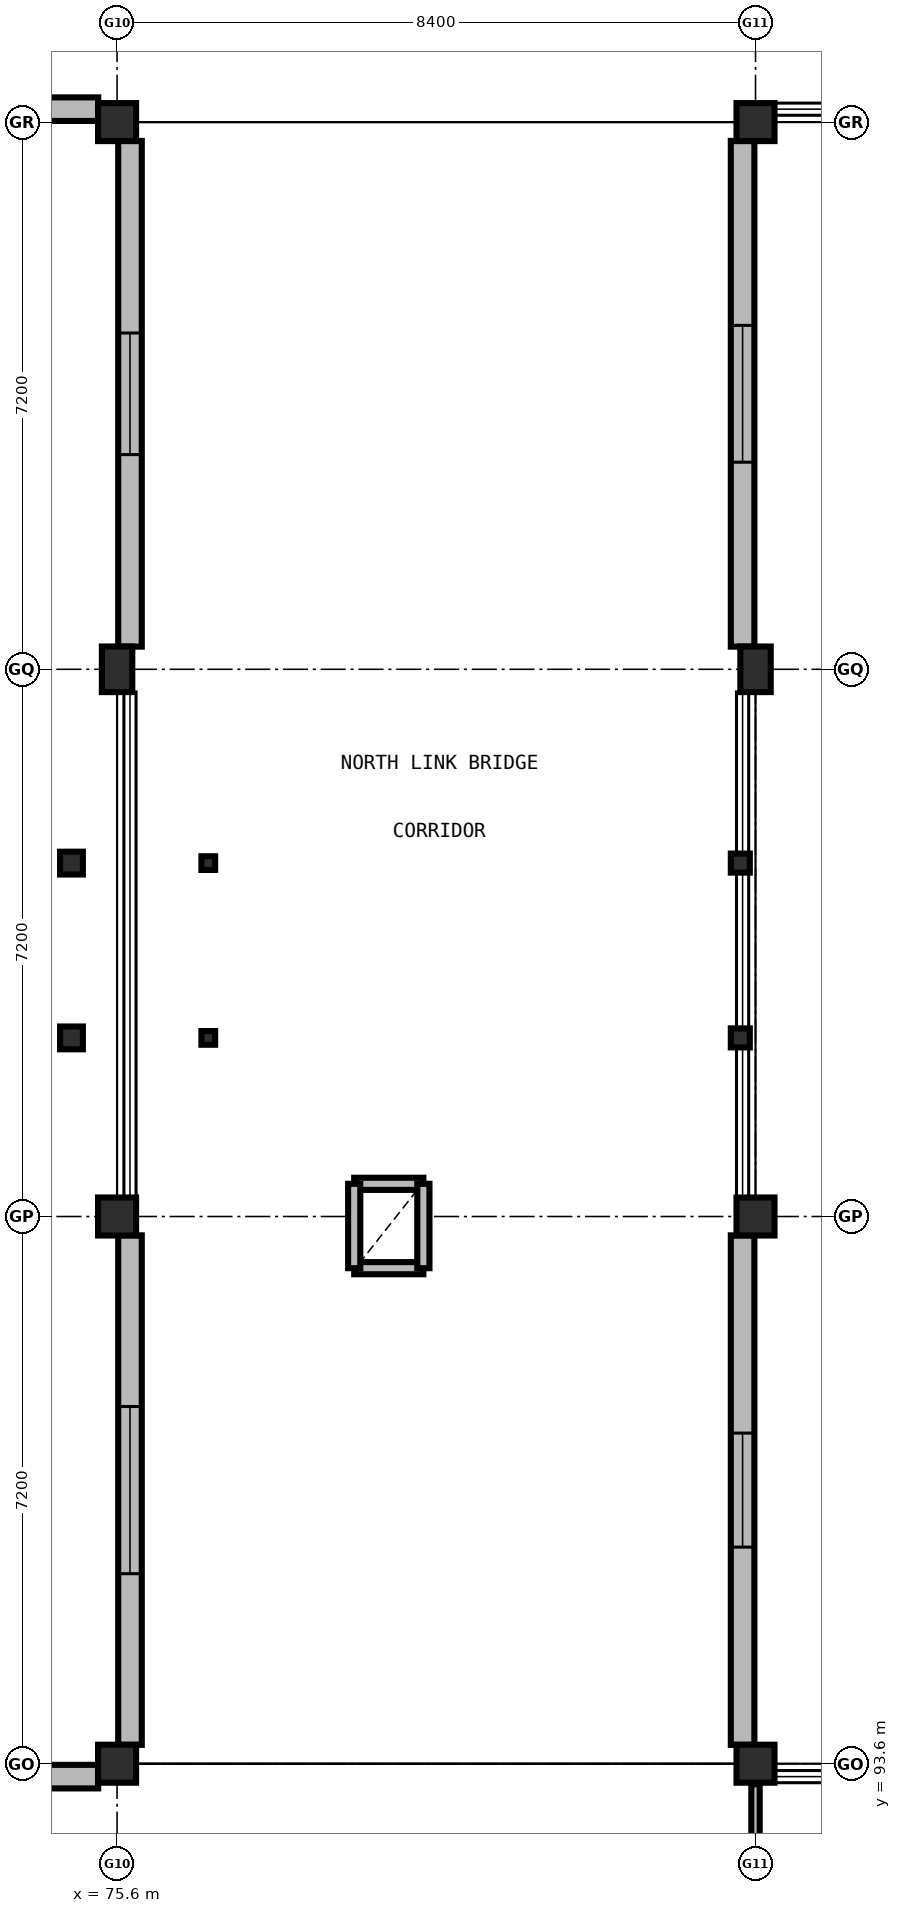
"""IFC4 building model, lengths in metres.
Left out: names, types, materials, properties, quantities, classifications, styles, units other than length and angle.
Written with IfcOpenShell. Run it as: python <this file> out.ifc"""

import sys

from ifc_helpers import new_model, si_unit, direction, frame, frame_2d, origin, origin_2d, place, context, subcontext, project, spatial, rectangle, hollow_rectangle, i_section, extrude, element, fill, save


model = new_model("IFC4")
c1 = context("Model", 3, precision=1e-05, world=origin(), true_north=direction((0.0, 1.0)))
c2 = subcontext(c1, "Body", "Model", "MODEL_VIEW")
j1 = project(units=[si_unit("LENGTHUNIT", "METRE"), si_unit("PLANEANGLEUNIT", "RADIAN")], contexts=[c1])
p1 = place(None, origin())
s1 = spatial("IfcSite", under=j1, at=p1, CompositionType="ELEMENT")
p2 = place(p1, origin())
s2 = spatial("IfcBuilding", under=s1, at=p2, CompositionType="ELEMENT")
p3 = place(p2, frame((0.0, 0.0, 13.5)))
s3 = spatial("IfcBuildingStorey", under=s2, at=p3, CompositionType="ELEMENT", Elevation=13.5)
for number, where, z_axis, x_axis in (
    (1, (75.6, 93.6, 0.0), (0.0, 0.0, 1.0), (1.0, 0.0, 0.0)),
    (2, (75.6, 100.8, 0.0), (0.0, 0.0, 1.0), (1.0, 0.0, 0.0)),
):
    element("IfcColumn", number, at=place(p3, frame(where, z_axis=z_axis, x_axis=x_axis)), inside=s3, PredefinedType="COLUMN", context=c2, shape_type="SweptSolid", body=[
        extrude(rectangle(XDim=0.5, YDim=0.5, at=origin_2d()), origin(), (0.0, 0.0, 1.0), 4.2),
    ])
p4 = place(p3, frame((75.6, 108.0, 0.0), z_axis=(0.0, 0.0, 1.0), x_axis=(1.0, 0.0, 0.0)))
e3 = element("IfcColumn", 3, at=p4, inside=s3, PredefinedType="COLUMN", context=c2, shape_type="SweptSolid", body=[
    extrude(rectangle(XDim=0.4, YDim=0.6, at=origin_2d()), origin(), (0.0, 0.0, 1.0), 4.2),
])
for number, where, z_axis, x_axis in (
    (4, (75.6, 115.2, 0.0), (0.0, 0.0, 1.0), (1.0, 0.0, 0.0)),
    (5, (84.0, 93.6, 0.0), (0.0, 0.0, 1.0), (1.0, 0.0, 0.0)),
    (6, (84.0, 100.8, 0.0), (0.0, 0.0, 1.0), (1.0, 0.0, 0.0)),
):
    element("IfcColumn", number, at=place(p3, frame(where, z_axis=z_axis, x_axis=x_axis)), inside=s3, PredefinedType="COLUMN", context=c2, shape_type="SweptSolid", body=[
        extrude(rectangle(XDim=0.5, YDim=0.5, at=origin_2d()), origin(), (0.0, 0.0, 1.0), 4.2),
    ])
p5 = place(p3, frame((84.0, 108.0, 0.0), z_axis=(0.0, 0.0, 1.0), x_axis=(1.0, 0.0, 0.0)))
e7 = element("IfcColumn", 7, at=p5, inside=s3, PredefinedType="COLUMN", context=c2, shape_type="SweptSolid", body=[
    extrude(rectangle(XDim=0.4, YDim=0.6, at=origin_2d()), origin(), (0.0, 0.0, 1.0), 4.2),
])
p6 = place(p3, frame((84.0, 115.2, 0.0), z_axis=(0.0, 0.0, 1.0), x_axis=(1.0, 0.0, 0.0)))
e8 = element("IfcColumn", 8, at=p6, inside=s3, PredefinedType="COLUMN", context=c2, shape_type="SweptSolid", body=[
    extrude(rectangle(XDim=0.5, YDim=0.5, at=origin_2d()), origin(), (0.0, 0.0, 1.0), 4.2),
])
for number, where, z_axis, x_axis in (
    (9, (75.0, 103.15, 0.0), (0.0, 0.0, 1.0), (1.0, 0.0, 0.0)),
    (10, (75.0, 105.45, 0.0), (0.0, 0.0, 1.0), (1.0, 0.0, 0.0)),
):
    element("IfcColumn", number, at=place(p3, frame(where, z_axis=z_axis, x_axis=x_axis)), inside=s3, PredefinedType="COLUMN", context=c2, shape_type="SweptSolid", body=[
        extrude(i_section(OverallWidth=0.3, OverallDepth=0.3, WebThickness=0.011, FlangeThickness=0.019, FilletRadius=0.027, at=origin_2d()), origin(), (0.0, 0.0, 1.0), 4.2),
    ])
for number, where, z_axis, x_axis in (
    (11, (76.8, 103.15, 0.0), (0.0, 0.0, 1.0), (1.0, 0.0, 0.0)),
    (12, (76.8, 105.45, 0.0), (0.0, 0.0, 1.0), (1.0, 0.0, 0.0)),
):
    element("IfcColumn", number, at=place(p3, frame(where, z_axis=z_axis, x_axis=x_axis)), inside=s3, PredefinedType="COLUMN", context=c2, shape_type="SweptSolid", body=[
        extrude(hollow_rectangle(XDim=0.18, YDim=0.18, WallThickness=0.008, at=origin_2d()), origin(), (0.0, 0.0, 1.0), 4.2),
    ])
for number, where, z_axis, x_axis in (
    (13, (83.8, 103.15, 0.0), (0.0, 0.0, 1.0), (1.0, 0.0, 0.0)),
    (14, (83.8, 105.45, 0.0), (0.0, 0.0, 1.0), (1.0, 0.0, 0.0)),
):
    element("IfcColumn", number, at=place(p3, frame(where, z_axis=z_axis, x_axis=x_axis)), inside=s3, PredefinedType="COLUMN", context=c2, shape_type="SweptSolid", body=[
        extrude(hollow_rectangle(XDim=0.25, YDim=0.25, WallThickness=0.01, at=origin_2d()), origin(), (0.0, 0.0, 1.0), 4.2),
    ])
p7 = place(p3, frame((67.448, 93.43, 0.0), z_axis=(0.0, 0.0, 1.0), x_axis=(1.0, 0.0, 0.0)))
e15 = element("IfcWall", 15, at=p7, inside=s3, PredefinedType="SOLIDWALL", context=c2, shape_type="SweptSolid", body=[
    extrude(rectangle(XDim=7.904, YDim=0.31, at=frame_2d((3.952, 0.0))), origin(), (0.0, 0.0, 1.0), 3.16),
])
p8 = place(p7, frame((2.252, 0.0, 0.95)))
e16 = element("IfcOpeningElement", 16, at=p8, cuts=e15, PredefinedType="OPENING", context=c2, shape_type="SweptSolid", body=[
    extrude(rectangle(XDim=3.4, YDim=1.8, at=frame_2d((1.7, 0.9))), frame((0.0, 0.165, 0.0), z_axis=(0.0, -1.0, 0.0), x_axis=(1.0, 0.0, 0.0)), (0.0, 0.0, 1.0), 0.33),
])
p9 = place(p3, frame((75.77, 93.848, 0.0), z_axis=(0.0, 0.0, 1.0), x_axis=(0.0, 1.0, 0.0)))
e17 = element("IfcWall", 17, at=p9, inside=s3, PredefinedType="SOLIDWALL", context=c2, shape_type="SweptSolid", body=[
    extrude(rectangle(XDim=6.704, YDim=0.31, at=frame_2d((3.352, 0.0))), origin(), (0.0, 0.0, 1.0), 3.86),
])
p10 = place(p9, frame((2.252, 0.0, 0.95)))
e18 = element("IfcOpeningElement", 18, at=p10, cuts=e17, PredefinedType="OPENING", context=c2, shape_type="SweptSolid", body=[
    extrude(rectangle(XDim=2.2, YDim=1.7, at=frame_2d((1.1, 0.85))), frame((0.0, 0.165, 0.0), z_axis=(0.0, -1.0, 0.0), x_axis=(1.0, 0.0, 0.0)), (0.0, 0.0, 1.0), 0.33),
])
p11 = place(p3, frame((75.77, 108.298, 0.0), z_axis=(0.0, 0.0, 1.0), x_axis=(0.0, 1.0, 0.0)))
e19 = element("IfcWall", 19, at=p11, inside=s3, PredefinedType="SOLIDWALL", context=c2, shape_type="SweptSolid", body=[
    extrude(rectangle(XDim=6.654, YDim=0.31, at=frame_2d((3.327, 0.0))), origin(), (0.0, 0.0, 1.0), 3.86),
])
p12 = place(p11, frame((2.527, 0.0, 0.95)))
e20 = element("IfcOpeningElement", 20, at=p12, cuts=e19, PredefinedType="OPENING", context=c2, shape_type="SweptSolid", body=[
    extrude(rectangle(XDim=1.6, YDim=1.6, at=frame_2d((0.8, 0.8))), frame((0.0, 0.165, 0.0), z_axis=(0.0, -1.0, 0.0), x_axis=(1.0, 0.0, 0.0)), (0.0, 0.0, 1.0), 0.33),
])
p13 = place(p3, frame((75.352, 115.37, 0.0), z_axis=(0.0, 0.0, 1.0), x_axis=(-1.0, 0.0, 0.0)))
e21 = element("IfcWall", 21, at=p13, inside=s3, PredefinedType="SOLIDWALL", context=c2, shape_type="SweptSolid", body=[
    extrude(rectangle(XDim=7.904, YDim=0.31, at=frame_2d((3.952, 0.0))), origin(), (0.0, 0.0, 1.0), 3.16),
])
p14 = place(p13, frame((0.968, 0.0, 0.95)))
e22 = element("IfcOpeningElement", 22, at=p14, cuts=e21, PredefinedType="OPENING", context=c2, shape_type="SweptSolid", body=[
    extrude(rectangle(XDim=2.5, YDim=1.96, at=frame_2d((1.25, 0.98))), frame((0.0, 0.165, 0.0), z_axis=(0.0, -1.0, 0.0), x_axis=(1.0, 0.0, 0.0)), (0.0, 0.0, 1.0), 0.33),
])
p15 = place(p13, frame((4.436, 0.0, 0.95)))
e23 = element("IfcOpeningElement", 23, at=p15, cuts=e21, PredefinedType="OPENING", context=c2, shape_type="SweptSolid", body=[
    extrude(rectangle(XDim=2.5, YDim=1.96, at=frame_2d((1.25, 0.98))), frame((0.0, 0.165, 0.0), z_axis=(0.0, -1.0, 0.0), x_axis=(1.0, 0.0, 0.0)), (0.0, 0.0, 1.0), 0.33),
])
p16 = place(p3, frame((83.83, 114.952, 0.0), z_axis=(0.0, 0.0, 1.0), x_axis=(0.0, -1.0, 0.0)))
e24 = element("IfcWall", 24, at=p16, inside=s3, PredefinedType="SOLIDWALL", context=c2, shape_type="SweptSolid", body=[
    extrude(rectangle(XDim=6.654, YDim=0.31, at=frame_2d((3.327, 0.0))), origin(), (0.0, 0.0, 1.0), 3.86),
])
p17 = place(p16, frame((2.427, 0.0, 0.95)))
e25 = element("IfcOpeningElement", 25, at=p17, cuts=e24, PredefinedType="OPENING", context=c2, shape_type="SweptSolid", body=[
    extrude(rectangle(XDim=1.8, YDim=1.5, at=frame_2d((0.9, 0.75))), frame((0.0, 0.165, 0.0), z_axis=(0.0, -1.0, 0.0), x_axis=(1.0, 0.0, 0.0)), (0.0, 0.0, 1.0), 0.33),
])
p18 = place(p3, frame((83.83, 100.552, 0.0), z_axis=(0.0, 0.0, 1.0), x_axis=(0.0, -1.0, 0.0)))
e26 = element("IfcWall", 26, at=p18, inside=s3, PredefinedType="SOLIDWALL", context=c2, shape_type="SweptSolid", body=[
    extrude(rectangle(XDim=6.704, YDim=0.31, at=frame_2d((3.352, 0.0))), origin(), (0.0, 0.0, 1.0), 3.86),
])
p19 = place(p18, frame((2.602, 0.0, 0.95)))
e27 = element("IfcOpeningElement", 27, at=p19, cuts=e26, PredefinedType="OPENING", context=c2, shape_type="SweptSolid", body=[
    extrude(rectangle(XDim=1.5, YDim=1.4, at=frame_2d((0.75, 0.7))), frame((0.0, 0.165, 0.0), z_axis=(0.0, -1.0, 0.0), x_axis=(1.0, 0.0, 0.0)), (0.0, 0.0, 1.0), 0.33),
])
for number, where, z_axis, x_axis in (
    (28, (78.72, 100.12, 0.0), (0.0, 0.0, 1.0), (1.0, 0.0, 0.0)),
    (29, (79.63, 101.23, 0.0), (0.0, 0.0, 1.0), (-1.0, 0.0, 0.0)),
):
    element("IfcWall", number, at=place(p3, frame(where, z_axis=z_axis, x_axis=x_axis)), inside=s3, PredefinedType="PARTITIONING", context=c2, shape_type="SweptSolid", body=[
        extrude(rectangle(XDim=0.91, YDim=0.16, at=frame_2d((0.455, 0.0))), origin(), (0.0, 0.0, 1.0), 3.65),
    ])
for number, where, z_axis, x_axis in (
    (30, (78.72, 101.23, 0.0), (0.0, 0.0, 1.0), (0.0, -1.0, 0.0)),
    (31, (79.63, 100.12, 0.0), (0.0, 0.0, 1.0), (0.0, 1.0, 0.0)),
):
    element("IfcWall", number, at=place(p3, frame(where, z_axis=z_axis, x_axis=x_axis)), inside=s3, PredefinedType="PARTITIONING", context=c2, shape_type="SweptSolid", body=[
        extrude(rectangle(XDim=1.11, YDim=0.16, at=frame_2d((0.555, 0.0))), origin(), (0.0, 0.0, 1.0), 3.65),
    ])
p20 = place(p3, frame((84.0, 89.5, 0.0), z_axis=(0.0, 0.0, 1.0), x_axis=(0.0, 1.0, 0.0)))
e32 = element("IfcWall", 32, at=p20, inside=s3, PredefinedType="PARTITIONING", context=c2, shape_type="SweptSolid", body=[
    extrude(rectangle(XDim=3.83, YDim=0.11, at=frame_2d((1.915, 0.0))), origin(), (0.0, 0.0, 1.0), 3.155),
])
p21 = place(p10, origin())
e33 = element("IfcWindow", 33, at=p21, inside=s3, PartitioningType="SINGLE_PANEL", PredefinedType="WINDOW", context=c2, shape_type="SweptSolid", body=[
    extrude(rectangle(XDim=2.2, YDim=1.7, at=frame_2d((1.1, 0.85))), frame((0.0, 0.03, 0.0), z_axis=(0.0, -1.0, 0.0), x_axis=(1.0, 0.0, 0.0)), (0.0, 0.0, 1.0), 0.06),
])
fill(e18, e33)
p22 = place(p12, origin())
e34 = element("IfcWindow", 34, at=p22, inside=s3, PartitioningType="SINGLE_PANEL", PredefinedType="WINDOW", context=c2, shape_type="SweptSolid", body=[
    extrude(rectangle(XDim=1.6, YDim=1.6, at=frame_2d((0.8, 0.8))), frame((0.0, 0.03, 0.0), z_axis=(0.0, -1.0, 0.0), x_axis=(1.0, 0.0, 0.0)), (0.0, 0.0, 1.0), 0.06),
])
fill(e20, e34)
p23 = place(p17, origin())
e35 = element("IfcWindow", 35, at=p23, inside=s3, PartitioningType="SINGLE_PANEL", PredefinedType="WINDOW", context=c2, shape_type="SweptSolid", body=[
    extrude(rectangle(XDim=1.8, YDim=1.5, at=frame_2d((0.9, 0.75))), frame((0.0, 0.03, 0.0), z_axis=(0.0, -1.0, 0.0), x_axis=(1.0, 0.0, 0.0)), (0.0, 0.0, 1.0), 0.06),
])
fill(e25, e35)
p24 = place(p19, origin())
e36 = element("IfcWindow", 36, at=p24, inside=s3, PartitioningType="SINGLE_PANEL", PredefinedType="WINDOW", context=c2, shape_type="SweptSolid", body=[
    extrude(rectangle(XDim=1.5, YDim=1.4, at=frame_2d((0.75, 0.7))), frame((0.0, 0.03, 0.0), z_axis=(0.0, -1.0, 0.0), x_axis=(1.0, 0.0, 0.0)), (0.0, 0.0, 1.0), 0.06),
])
fill(e27, e36)
save(model, sys.argv[1])
